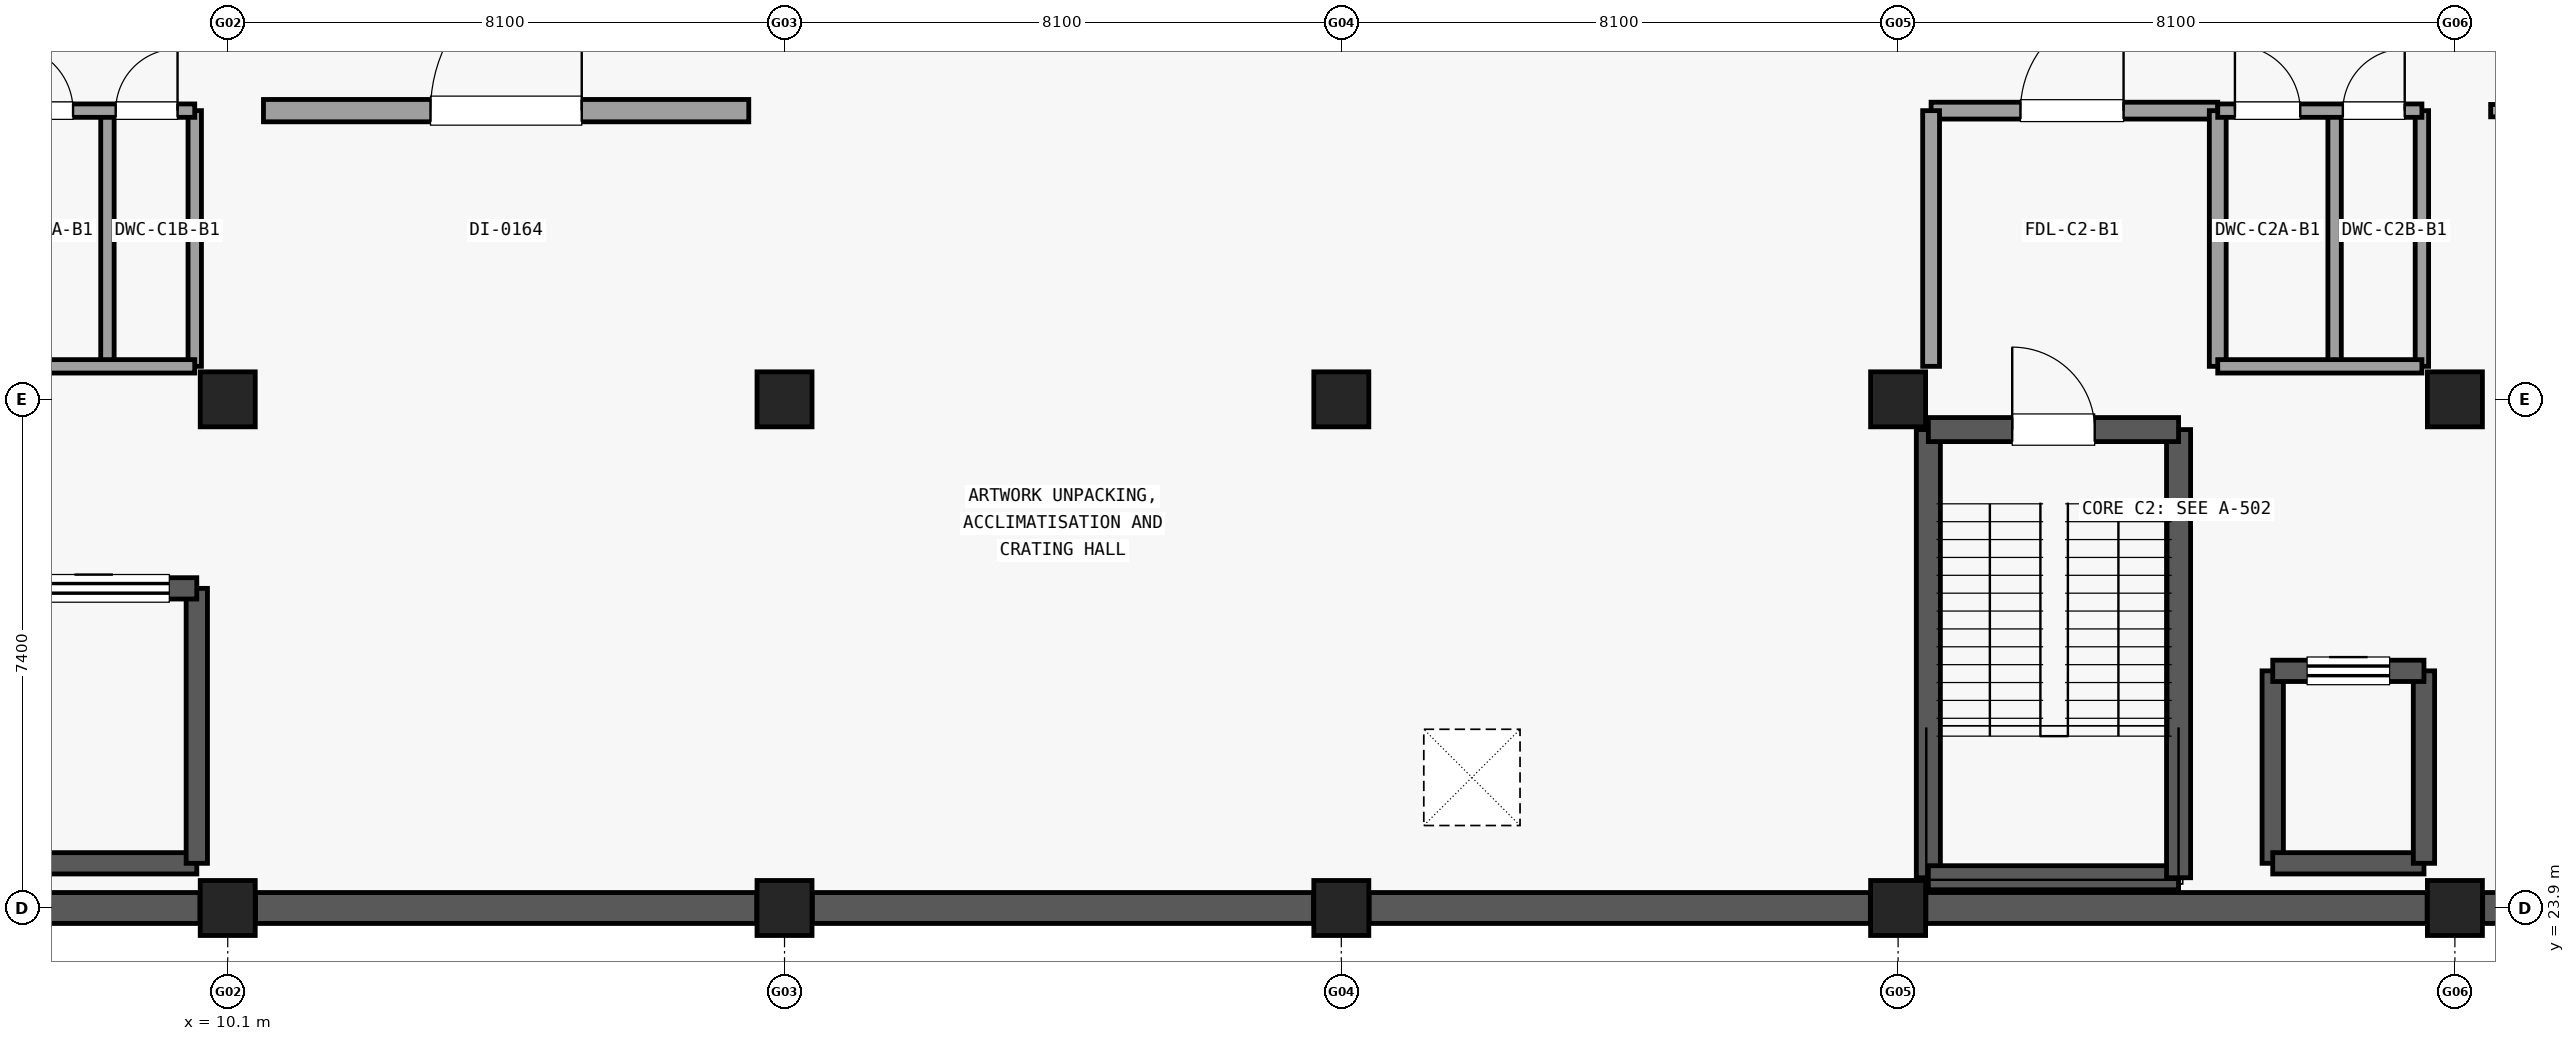
"""IFC4 building model, lengths in metres.
Left out: names, types, materials, properties, quantities, classifications, styles, units other than length and angle.
Written with IfcOpenShell. Run it as: python <this file> out.ifc"""

import sys

from ifc_helpers import new_model, si_unit, direction, frame, frame_2d, origin, origin_2d, place, context, subcontext, project, spatial, rectangle, extrude, element, fill, save


model = new_model("IFC4")
c1 = context("Model", 3, precision=1e-05, world=origin(), true_north=direction((0.0, 1.0)))
c2 = subcontext(c1, "Body", "Model", "MODEL_VIEW")
j1 = project(units=[si_unit("LENGTHUNIT", "METRE"), si_unit("PLANEANGLEUNIT", "RADIAN")], contexts=[c1])
p1 = place(None, origin())
s1 = spatial("IfcSite", under=j1, at=p1, CompositionType="ELEMENT")
p2 = place(p1, origin())
s2 = spatial("IfcBuilding", under=s1, at=p2, CompositionType="ELEMENT")
p3 = place(p2, frame((0.0, 0.0, -4.8)))
s3 = spatial("IfcBuildingStorey", under=s2, at=p3, CompositionType="ELEMENT", Elevation=-4.8)
for number, where, z_axis, x_axis in (
    (1, (10.1, 23.9, 0.0), (0.0, 0.0, 1.0), (1.0, 0.0, 0.0)),
    (2, (10.1, 31.3, 0.0), (0.0, 0.0, 1.0), (1.0, 0.0, 0.0)),
    (3, (18.2, 23.9, 0.0), (0.0, 0.0, 1.0), (1.0, 0.0, 0.0)),
    (4, (18.2, 31.3, 0.0), (0.0, 0.0, 1.0), (1.0, 0.0, 0.0)),
    (5, (26.3, 23.9, 0.0), (0.0, 0.0, 1.0), (1.0, 0.0, 0.0)),
    (6, (26.3, 31.3, 0.0), (0.0, 0.0, 1.0), (1.0, 0.0, 0.0)),
    (7, (34.4, 23.9, 0.0), (0.0, 0.0, 1.0), (1.0, 0.0, 0.0)),
    (8, (34.4, 31.3, 0.0), (0.0, 0.0, 1.0), (1.0, 0.0, 0.0)),
    (9, (42.5, 23.9, 0.0), (0.0, 0.0, 1.0), (1.0, 0.0, 0.0)),
    (10, (42.5, 31.3, 0.0), (0.0, 0.0, 1.0), (1.0, 0.0, 0.0)),
):
    element("IfcColumn", number, at=place(p3, frame(where, z_axis=z_axis, x_axis=x_axis)), inside=s3, PredefinedType="COLUMN", context=c2, shape_type="SweptSolid", body=[
        extrude(rectangle(XDim=0.8, YDim=0.8, at=origin_2d()), origin(), (0.0, 0.0, 1.0), 4.52),
    ])
for number, where, z_axis, x_axis in (
    (11, (9.696, 23.9, 0.0), (0.0, 0.0, 1.0), (-1.0, 0.0, 0.0)),
    (12, (17.796, 23.9, 0.0), (0.0, 0.0, 1.0), (-1.0, 0.0, 0.0)),
    (13, (25.896, 23.9, 0.0), (0.0, 0.0, 1.0), (-1.0, 0.0, 0.0)),
    (14, (33.996, 23.9, 0.0), (0.0, 0.0, 1.0), (-1.0, 0.0, 0.0)),
    (15, (42.096, 23.9, 0.0), (0.0, 0.0, 1.0), (-1.0, 0.0, 0.0)),
    (16, (50.196, 23.9, 0.0), (0.0, 0.0, 1.0), (-1.0, 0.0, 0.0)),
):
    element("IfcWall", number, at=place(p3, frame(where, z_axis=z_axis, x_axis=x_axis)), inside=s3, PredefinedType="USERDEFINED", context=c2, shape_type="SweptSolid", body=[
        extrude(rectangle(XDim=7.292, YDim=0.45, at=frame_2d((3.646, 0.0))), origin(), (0.0, 0.0, 1.0), 2.95),
    ])
p4 = place(p3, frame((6.65, 24.55, 0.0), z_axis=(0.0, 0.0, 1.0), x_axis=(1.0, 0.0, 0.0)))
e17 = element("IfcWall", 17, at=p4, inside=s3, PredefinedType="SHEAR", context=c2, shape_type="SweptSolid", body=[
    extrude(rectangle(XDim=3.0, YDim=0.31, at=frame_2d((1.5, 0.0))), origin(), (0.0, 0.0, 1.0), 4.515),
])
p5 = place(p3, frame((9.65, 24.55, 0.0), z_axis=(0.0, 0.0, 1.0), x_axis=(0.0, 1.0, 0.0)))
e18 = element("IfcWall", 18, at=p5, inside=s3, PredefinedType="SHEAR", context=c2, shape_type="SweptSolid", body=[
    extrude(rectangle(XDim=4.0, YDim=0.31, at=frame_2d((2.0, 0.0))), origin(), (0.0, 0.0, 1.0), 4.515),
])
p6 = place(p3, frame((6.65, 28.55, 0.0), z_axis=(0.0, 0.0, 1.0), x_axis=(1.0, 0.0, 0.0)))
e19 = element("IfcWall", 19, at=p6, inside=s3, PredefinedType="SHEAR", context=c2, shape_type="SweptSolid", body=[
    extrude(rectangle(XDim=3.0, YDim=0.31, at=frame_2d((1.5, 0.0))), origin(), (0.0, 0.0, 1.0), 4.515),
])
p7 = place(p6, frame((0.4, 0.0, 0.0)))
e20 = element("IfcOpeningElement", 20, at=p7, cuts=e19, PredefinedType="OPENING", context=c2, shape_type="SweptSolid", body=[
    extrude(rectangle(XDim=2.2, YDim=2.55, at=frame_2d((1.1, 1.275))), frame((0.0, 0.165, 0.0), z_axis=(0.0, -1.0, 0.0), x_axis=(1.0, 0.0, 0.0)), (0.0, 0.0, 1.0), 0.33),
])
for number, where, z_axis, x_axis in (
    (21, (8.35, 31.78, 0.0), (0.0, 0.0, 1.0), (0.0, 1.0, 0.0)),
    (22, (9.62, 31.78, 0.0), (0.0, 0.0, 1.0), (0.0, 1.0, 0.0)),
):
    element("IfcWall", number, at=place(p3, frame(where, z_axis=z_axis, x_axis=x_axis)), inside=s3, PredefinedType="PARTITIONING", context=c2, shape_type="SweptSolid", body=[
        extrude(rectangle(XDim=3.72, YDim=0.195, at=frame_2d((1.86, 0.0))), origin(), (0.0, 0.0, 1.0), 3.66),
    ])
p8 = place(p3, frame((6.65, 31.78, 0.0), z_axis=(0.0, 0.0, 1.0), x_axis=(1.0, 0.0, 0.0)))
e23 = element("IfcWall", 23, at=p8, inside=s3, PredefinedType="PARTITIONING", context=c2, shape_type="SweptSolid", body=[
    extrude(rectangle(XDim=2.97, YDim=0.195, at=frame_2d((1.485, 0.0))), origin(), (0.0, 0.0, 1.0), 3.66),
])
p9 = place(p3, frame((6.65, 35.5, 0.0), z_axis=(0.0, 0.0, 1.0), x_axis=(1.0, 0.0, 0.0)))
e24 = element("IfcWall", 24, at=p9, inside=s3, PredefinedType="PARTITIONING", context=c2, shape_type="SweptSolid", body=[
    extrude(rectangle(XDim=2.97, YDim=0.195, at=frame_2d((1.485, 0.0))), origin(), (0.0, 0.0, 1.0), 3.66),
])
p10 = place(p9, frame((0.25, 0.0, 0.0)))
e25 = element("IfcOpeningElement", 25, at=p10, cuts=e24, PredefinedType="OPENING", context=c2, shape_type="SweptSolid", body=[
    extrude(rectangle(XDim=0.95, YDim=2.1, at=frame_2d((0.475, 1.05))), frame((0.0, 0.107, 0.0), z_axis=(0.0, -1.0, 0.0), x_axis=(1.0, 0.0, 0.0)), (0.0, 0.0, 1.0), 0.215),
])
p11 = place(p9, frame((1.82, 0.0, 0.0)))
e26 = element("IfcOpeningElement", 26, at=p11, cuts=e24, PredefinedType="OPENING", context=c2, shape_type="SweptSolid", body=[
    extrude(rectangle(XDim=0.9, YDim=2.1, at=frame_2d((0.45, 1.05))), frame((0.0, 0.107, 0.0), z_axis=(0.0, -1.0, 0.0), x_axis=(1.0, 0.0, 0.0)), (0.0, 0.0, 1.0), 0.215),
])
p12 = place(p3, frame((34.84, 24.34, 0.0), z_axis=(0.0, 0.0, 1.0), x_axis=(0.0, 1.0, 0.0)))
e27 = element("IfcWall", 27, at=p12, inside=s3, PredefinedType="SHEAR", context=c2, shape_type="SweptSolid", body=[
    extrude(rectangle(XDim=6.52, YDim=0.35, at=frame_2d((3.26, 0.0))), origin(), (0.0, 0.0, 1.0), 4.515),
])
p13 = place(p3, frame((34.84, 24.34, 0.0), z_axis=(0.0, 0.0, 1.0), x_axis=(1.0, 0.0, 0.0)))
e28 = element("IfcWall", 28, at=p13, inside=s3, PredefinedType="SHEAR", context=c2, shape_type="SweptSolid", body=[
    extrude(rectangle(XDim=3.64, YDim=0.35, at=frame_2d((1.82, 0.0))), origin(), (0.0, 0.0, 1.0), 4.515),
])
p14 = place(p3, frame((38.48, 24.34, 0.0), z_axis=(0.0, 0.0, 1.0), x_axis=(0.0, 1.0, 0.0)))
e29 = element("IfcWall", 29, at=p14, inside=s3, PredefinedType="SHEAR", context=c2, shape_type="SweptSolid", body=[
    extrude(rectangle(XDim=6.52, YDim=0.35, at=frame_2d((3.26, 0.0))), origin(), (0.0, 0.0, 1.0), 4.515),
])
p15 = place(p3, frame((34.84, 30.86, 0.0), z_axis=(0.0, 0.0, 1.0), x_axis=(1.0, 0.0, 0.0)))
e30 = element("IfcWall", 30, at=p15, inside=s3, PredefinedType="SHEAR", context=c2, shape_type="SweptSolid", body=[
    extrude(rectangle(XDim=3.64, YDim=0.35, at=frame_2d((1.82, 0.0))), origin(), (0.0, 0.0, 1.0), 4.515),
])
p16 = place(p15, frame((1.22, 0.0, 0.0)))
e31 = element("IfcOpeningElement", 31, at=p16, cuts=e30, PredefinedType="OPENING", context=c2, shape_type="SweptSolid", body=[
    extrude(rectangle(XDim=1.2, YDim=2.15, at=frame_2d((0.6, 1.075))), frame((0.0, 0.185, 0.0), z_axis=(0.0, -1.0, 0.0), x_axis=(1.0, 0.0, 0.0)), (0.0, 0.0, 1.0), 0.37),
])
p17 = place(p3, frame((39.85, 24.55, 0.0), z_axis=(0.0, 0.0, 1.0), x_axis=(0.0, 1.0, 0.0)))
e32 = element("IfcWall", 32, at=p17, inside=s3, PredefinedType="SHEAR", context=c2, shape_type="SweptSolid", body=[
    extrude(rectangle(XDim=2.8, YDim=0.31, at=frame_2d((1.4, 0.0))), origin(), (0.0, 0.0, 1.0), 4.515),
])
p18 = place(p3, frame((39.85, 24.55, 0.0), z_axis=(0.0, 0.0, 1.0), x_axis=(1.0, 0.0, 0.0)))
e33 = element("IfcWall", 33, at=p18, inside=s3, PredefinedType="SHEAR", context=c2, shape_type="SweptSolid", body=[
    extrude(rectangle(XDim=2.2, YDim=0.31, at=frame_2d((1.1, 0.0))), origin(), (0.0, 0.0, 1.0), 4.515),
])
p19 = place(p3, frame((42.05, 24.55, 0.0), z_axis=(0.0, 0.0, 1.0), x_axis=(0.0, 1.0, 0.0)))
e34 = element("IfcWall", 34, at=p19, inside=s3, PredefinedType="SHEAR", context=c2, shape_type="SweptSolid", body=[
    extrude(rectangle(XDim=2.8, YDim=0.31, at=frame_2d((1.4, 0.0))), origin(), (0.0, 0.0, 1.0), 4.515),
])
p20 = place(p3, frame((39.85, 27.35, 0.0), z_axis=(0.0, 0.0, 1.0), x_axis=(1.0, 0.0, 0.0)))
e35 = element("IfcWall", 35, at=p20, inside=s3, PredefinedType="SHEAR", context=c2, shape_type="SweptSolid", body=[
    extrude(rectangle(XDim=2.2, YDim=0.31, at=frame_2d((1.1, 0.0))), origin(), (0.0, 0.0, 1.0), 4.515),
])
p21 = place(p20, frame((0.5, 0.0, 0.0)))
e36 = element("IfcOpeningElement", 36, at=p21, cuts=e35, PredefinedType="OPENING", context=c2, shape_type="SweptSolid", body=[
    extrude(rectangle(XDim=1.2, YDim=2.15, at=frame_2d((0.6, 1.075))), frame((0.0, 0.165, 0.0), z_axis=(0.0, -1.0, 0.0), x_axis=(1.0, 0.0, 0.0)), (0.0, 0.0, 1.0), 0.33),
])
p22 = place(p3, frame((34.88, 35.5, 0.0), z_axis=(0.0, 0.0, 1.0), x_axis=(1.0, 0.0, 0.0)))
e37 = element("IfcWall", 37, at=p22, inside=s3, PredefinedType="PARTITIONING", context=c2, shape_type="SweptSolid", body=[
    extrude(rectangle(XDim=4.17, YDim=0.245, at=frame_2d((2.085, 0.0))), origin(), (0.0, 0.0, 1.0), 3.66),
])
p23 = place(p22, frame((1.3, 0.0, 0.0)))
e38 = element("IfcOpeningElement", 38, at=p23, cuts=e37, PredefinedType="OPENING", context=c2, shape_type="SweptSolid", body=[
    extrude(rectangle(XDim=1.5, YDim=2.15, at=frame_2d((0.75, 1.075))), frame((0.0, 0.133, 0.0), z_axis=(0.0, -1.0, 0.0), x_axis=(1.0, 0.0, 0.0)), (0.0, 0.0, 1.0), 0.265),
])
for number, where, z_axis, x_axis in (
    (39, (34.88, 31.78, 0.0), (0.0, 0.0, 1.0), (0.0, 1.0, 0.0)),
    (40, (39.05, 31.78, 0.0), (0.0, 0.0, 1.0), (0.0, 1.0, 0.0)),
):
    element("IfcWall", number, at=place(p3, frame(where, z_axis=z_axis, x_axis=x_axis)), inside=s3, PredefinedType="PARTITIONING", context=c2, shape_type="SweptSolid", body=[
        extrude(rectangle(XDim=3.72, YDim=0.245, at=frame_2d((1.86, 0.0))), origin(), (0.0, 0.0, 1.0), 3.66),
    ])
for number, where, z_axis, x_axis in (
    (41, (40.75, 31.78, 0.0), (0.0, 0.0, 1.0), (0.0, 1.0, 0.0)),
    (42, (42.02, 31.78, 0.0), (0.0, 0.0, 1.0), (0.0, 1.0, 0.0)),
):
    element("IfcWall", number, at=place(p3, frame(where, z_axis=z_axis, x_axis=x_axis)), inside=s3, PredefinedType="PARTITIONING", context=c2, shape_type="SweptSolid", body=[
        extrude(rectangle(XDim=3.72, YDim=0.195, at=frame_2d((1.86, 0.0))), origin(), (0.0, 0.0, 1.0), 3.66),
    ])
p24 = place(p3, frame((39.05, 31.78, 0.0), z_axis=(0.0, 0.0, 1.0), x_axis=(1.0, 0.0, 0.0)))
e43 = element("IfcWall", 43, at=p24, inside=s3, PredefinedType="PARTITIONING", context=c2, shape_type="SweptSolid", body=[
    extrude(rectangle(XDim=2.97, YDim=0.195, at=frame_2d((1.485, 0.0))), origin(), (0.0, 0.0, 1.0), 3.66),
])
p25 = place(p3, frame((39.05, 35.5, 0.0), z_axis=(0.0, 0.0, 1.0), x_axis=(1.0, 0.0, 0.0)))
e44 = element("IfcWall", 44, at=p25, inside=s3, PredefinedType="PARTITIONING", context=c2, shape_type="SweptSolid", body=[
    extrude(rectangle(XDim=2.97, YDim=0.195, at=frame_2d((1.485, 0.0))), origin(), (0.0, 0.0, 1.0), 3.66),
])
p26 = place(p25, frame((0.25, 0.0, 0.0)))
e45 = element("IfcOpeningElement", 45, at=p26, cuts=e44, PredefinedType="OPENING", context=c2, shape_type="SweptSolid", body=[
    extrude(rectangle(XDim=0.95, YDim=2.1, at=frame_2d((0.475, 1.05))), frame((0.0, 0.107, 0.0), z_axis=(0.0, -1.0, 0.0), x_axis=(1.0, 0.0, 0.0)), (0.0, 0.0, 1.0), 0.215),
])
p27 = place(p25, frame((1.82, 0.0, 0.0)))
e46 = element("IfcOpeningElement", 46, at=p27, cuts=e44, PredefinedType="OPENING", context=c2, shape_type="SweptSolid", body=[
    extrude(rectangle(XDim=0.9, YDim=2.1, at=frame_2d((0.45, 1.05))), frame((0.0, 0.107, 0.0), z_axis=(0.0, -1.0, 0.0), x_axis=(1.0, 0.0, 0.0)), (0.0, 0.0, 1.0), 0.215),
])
p28 = place(p3, frame((10.62, 35.5, 0.0), z_axis=(0.0, 0.0, 1.0), x_axis=(1.0, 0.0, 0.0)))
e47 = element("IfcWall", 47, at=p28, inside=s3, PredefinedType="SHEAR", context=c2, shape_type="SweptSolid", body=[
    extrude(rectangle(XDim=7.06, YDim=0.325, at=frame_2d((3.53, 0.0))), origin(), (0.0, 0.0, 1.0), 3.66),
])
p29 = place(p28, frame((2.43, 0.0, 0.0)))
e48 = element("IfcOpeningElement", 48, at=p29, cuts=e47, PredefinedType="OPENING", context=c2, shape_type="SweptSolid", body=[
    extrude(rectangle(XDim=2.2, YDim=2.65, at=frame_2d((1.1, 1.325))), frame((0.0, 0.172, 0.0), z_axis=(0.0, -1.0, 0.0), x_axis=(1.0, 0.0, 0.0)), (0.0, 0.0, 1.0), 0.345),
])
p30 = place(p3, frame((43.02, 35.5, 0.0), z_axis=(0.0, 0.0, 1.0), x_axis=(1.0, 0.0, 0.0)))
e49 = element("IfcWall", 49, at=p30, inside=s3, PredefinedType="PARTITIONING", context=c2, shape_type="SweptSolid", body=[
    extrude(rectangle(XDim=7.06, YDim=0.18, at=frame_2d((3.53, 0.0))), origin(), (0.0, 0.0, 1.0), 3.66),
])
p31 = place(p30, frame((2.88, 0.0, 0.0)))
e50 = element("IfcOpeningElement", 50, at=p31, cuts=e49, PredefinedType="OPENING", context=c2, shape_type="SweptSolid", body=[
    extrude(rectangle(XDim=1.3, YDim=2.2, at=frame_2d((0.65, 1.1))), frame((0.0, 0.1, 0.0), z_axis=(0.0, -1.0, 0.0), x_axis=(1.0, 0.0, 0.0)), (0.0, 0.0, 1.0), 0.2),
])
p32 = place(p7, origin())
e51 = element("IfcDoor", 51, at=p32, inside=s3, OperationType="SLIDING_TO_LEFT", PredefinedType="DOOR", context=c2, shape_type="SweptSolid", body=[
    extrude(rectangle(XDim=2.2, YDim=2.55, at=frame_2d((1.1, 1.275))), frame((0.0, 0.025, 0.0), z_axis=(0.0, -1.0, 0.0), x_axis=(1.0, 0.0, 0.0)), (0.0, 0.0, 1.0), 0.05),
])
fill(e20, e51)
p33 = place(p10, origin())
e52 = element("IfcDoor", 52, at=p33, inside=s3, OperationType="SINGLE_SWING_LEFT", PredefinedType="DOOR", context=c2, shape_type="SweptSolid", body=[
    extrude(rectangle(XDim=0.95, YDim=2.1, at=frame_2d((0.475, 1.05))), frame((0.0, 0.025, 0.0), z_axis=(0.0, -1.0, 0.0), x_axis=(1.0, 0.0, 0.0)), (0.0, 0.0, 1.0), 0.05),
])
fill(e25, e52)
p34 = place(p11, origin())
e53 = element("IfcDoor", 53, at=p34, inside=s3, OperationType="SINGLE_SWING_RIGHT", PredefinedType="DOOR", context=c2, shape_type="SweptSolid", body=[
    extrude(rectangle(XDim=0.9, YDim=2.1, at=frame_2d((0.45, 1.05))), frame((0.0, 0.025, 0.0), z_axis=(0.0, -1.0, 0.0), x_axis=(1.0, 0.0, 0.0)), (0.0, 0.0, 1.0), 0.05),
])
fill(e26, e53)
p35 = place(p16, origin())
e54 = element("IfcDoor", 54, at=p35, inside=s3, OperationType="SINGLE_SWING_LEFT", PredefinedType="DOOR", context=c2, shape_type="SweptSolid", body=[
    extrude(rectangle(XDim=1.2, YDim=2.15, at=frame_2d((0.6, 1.075))), frame((0.0, 0.025, 0.0), z_axis=(0.0, -1.0, 0.0), x_axis=(1.0, 0.0, 0.0)), (0.0, 0.0, 1.0), 0.05),
])
fill(e31, e54)
p36 = place(p21, origin())
e55 = element("IfcDoor", 55, at=p36, inside=s3, OperationType="SLIDING_TO_LEFT", PredefinedType="DOOR", context=c2, shape_type="SweptSolid", body=[
    extrude(rectangle(XDim=1.2, YDim=2.15, at=frame_2d((0.6, 1.075))), frame((0.0, 0.025, 0.0), z_axis=(0.0, -1.0, 0.0), x_axis=(1.0, 0.0, 0.0)), (0.0, 0.0, 1.0), 0.05),
])
fill(e36, e55)
p37 = place(p23, origin())
e56 = element("IfcDoor", 56, at=p37, inside=s3, OperationType="SINGLE_SWING_RIGHT", PredefinedType="DOOR", context=c2, shape_type="SweptSolid", body=[
    extrude(rectangle(XDim=1.5, YDim=2.15, at=frame_2d((0.75, 1.075))), frame((0.0, 0.025, 0.0), z_axis=(0.0, -1.0, 0.0), x_axis=(1.0, 0.0, 0.0)), (0.0, 0.0, 1.0), 0.05),
])
fill(e38, e56)
p38 = place(p26, origin())
e57 = element("IfcDoor", 57, at=p38, inside=s3, OperationType="SINGLE_SWING_LEFT", PredefinedType="DOOR", context=c2, shape_type="SweptSolid", body=[
    extrude(rectangle(XDim=0.95, YDim=2.1, at=frame_2d((0.475, 1.05))), frame((0.0, 0.025, 0.0), z_axis=(0.0, -1.0, 0.0), x_axis=(1.0, 0.0, 0.0)), (0.0, 0.0, 1.0), 0.05),
])
fill(e45, e57)
p39 = place(p27, origin())
e58 = element("IfcDoor", 58, at=p39, inside=s3, OperationType="SINGLE_SWING_RIGHT", PredefinedType="DOOR", context=c2, shape_type="SweptSolid", body=[
    extrude(rectangle(XDim=0.9, YDim=2.1, at=frame_2d((0.45, 1.05))), frame((0.0, 0.025, 0.0), z_axis=(0.0, -1.0, 0.0), x_axis=(1.0, 0.0, 0.0)), (0.0, 0.0, 1.0), 0.05),
])
fill(e46, e58)
p40 = place(p29, origin())
e59 = element("IfcDoor", 59, at=p40, inside=s3, OperationType="SINGLE_SWING_RIGHT", PredefinedType="DOOR", context=c2, shape_type="SweptSolid", body=[
    extrude(rectangle(XDim=2.2, YDim=2.65, at=frame_2d((1.1, 1.325))), frame((0.0, 0.025, 0.0), z_axis=(0.0, -1.0, 0.0), x_axis=(1.0, 0.0, 0.0)), (0.0, 0.0, 1.0), 0.05),
])
fill(e48, e59)
save(model, sys.argv[1])
